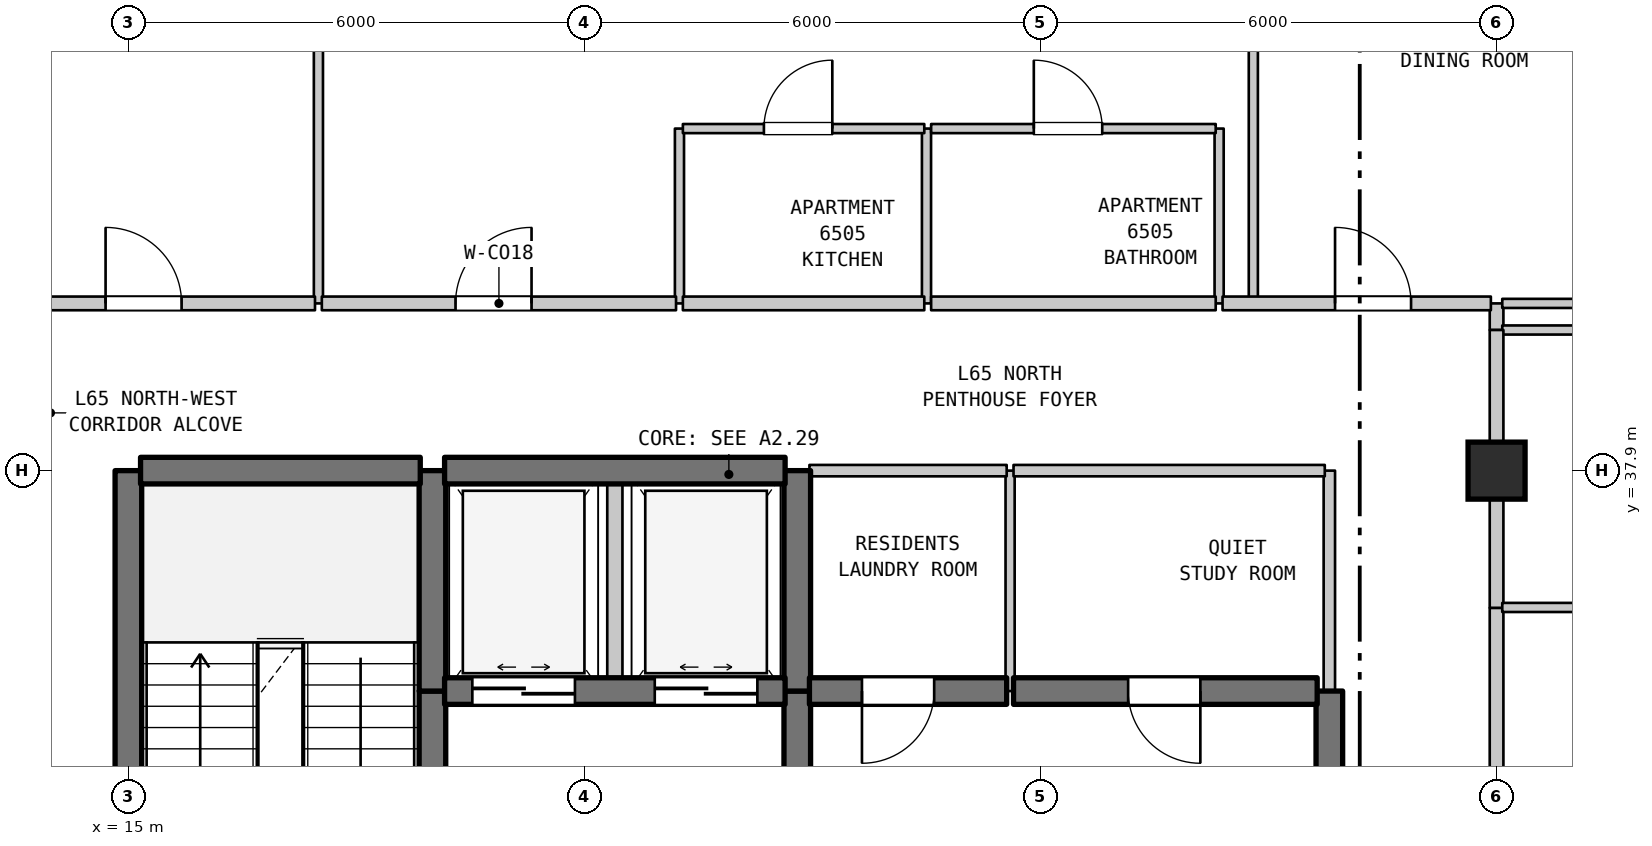
"""IFC4 building model, lengths in metres.
Left out: names, types, materials, properties, quantities, classifications, styles, units other than length and angle.
Written with IfcOpenShell. Run it as: python <this file> out.ifc"""

import sys

from ifc_helpers import new_model, si_unit, direction, frame, frame_2d, origin, origin_2d, place, context, subcontext, project, spatial, rectangle, extrude, element, fill, save


model = new_model("IFC4")
c1 = context("Model", 3, precision=1e-05, world=origin(), true_north=direction((0.0, 1.0)))
c2 = subcontext(c1, "Body", "Model", "MODEL_VIEW")
j1 = project(units=[si_unit("LENGTHUNIT", "METRE"), si_unit("PLANEANGLEUNIT", "RADIAN")], contexts=[c1])
p1 = place(None, origin())
s1 = spatial("IfcSite", under=j1, at=p1, CompositionType="ELEMENT")
p2 = place(p1, origin())
s2 = spatial("IfcBuilding", under=s1, at=p2, CompositionType="ELEMENT")
p3 = place(p2, frame((0.0, 0.0, 262.1)))
s3 = spatial("IfcBuildingStorey", under=s2, at=p3, CompositionType="ELEMENT", Elevation=262.1)
p4 = place(p3, frame((33.0, 37.9, 0.0), z_axis=(0.0, 0.0, 1.0), x_axis=(1.0, 0.0, 0.0)))
e1 = element("IfcColumn", 1, at=p4, inside=s3, PredefinedType="COLUMN", context=c2, shape_type="SweptSolid", body=[
    extrude(rectangle(XDim=0.75, YDim=0.75, at=origin_2d()), origin(), (0.0, 0.0, 1.0), 3.7),
])
p5 = place(p3, frame((15.0, 31.1, 0.0), z_axis=(0.0, 0.0, 1.0), x_axis=(0.0, 1.0, 0.0)))
e2 = element("IfcWall", 2, at=p5, inside=s3, PredefinedType="SHEAR", context=c2, shape_type="SweptSolid", body=[
    extrude(rectangle(XDim=6.8, YDim=0.35, at=frame_2d((3.4, 0.0))), origin(), (0.0, 0.0, 1.0), 3.39),
])
p6 = place(p3, frame((17.5, 40.1, 0.0), z_axis=(0.0, 0.0, 1.0), x_axis=(0.0, 1.0, 0.0)))
e3 = element("IfcWall", 3, at=p6, inside=s3, PredefinedType="PARTITIONING", context=c2, shape_type="SweptSolid", body=[
    extrude(rectangle(XDim=13.79, YDim=0.12, at=frame_2d((6.895, 0.0))), origin(), (0.0, 0.0, 1.0), 3.39),
])
p7 = place(p3, frame((19.0, 29.5, 0.0), z_axis=(0.0, 0.0, 1.0), x_axis=(0.0, 1.0, 0.0)))
e4 = element("IfcWall", 4, at=p7, inside=s3, PredefinedType="SHEAR", context=c2, shape_type="SweptSolid", body=[
    extrude(rectangle(XDim=5.5, YDim=0.35, at=frame_2d((2.75, 0.0))), origin(), (0.0, 0.0, 1.0), 3.39),
])
p8 = place(p7, frame((2.025, 0.0, 0.0)))
e5 = element("IfcOpeningElement", 5, at=p8, cuts=e4, PredefinedType="OPENING", context=c2, shape_type="SweptSolid", body=[
    extrude(rectangle(XDim=1.1, YDim=2.15, at=frame_2d((0.55, 1.075))), frame((0.0, 0.185, 0.0), z_axis=(0.0, -1.0, 0.0), x_axis=(1.0, 0.0, 0.0)), (0.0, 0.0, 1.0), 0.37),
])
p9 = place(p3, frame((19.0, 35.0, 0.0), z_axis=(0.0, 0.0, 1.0), x_axis=(0.0, 1.0, 0.0)))
e6 = element("IfcWall", 6, at=p9, inside=s3, PredefinedType="SHEAR", context=c2, shape_type="SweptSolid", body=[
    extrude(rectangle(XDim=2.9, YDim=0.35, at=frame_2d((1.45, 0.0))), origin(), (0.0, 0.0, 1.0), 3.39),
])
p10 = place(p3, frame((21.4, 35.0, 0.0), z_axis=(0.0, 0.0, 1.0), x_axis=(0.0, 1.0, 0.0)))
e7 = element("IfcWall", 7, at=p10, inside=s3, PredefinedType="STANDARD", context=c2, shape_type="SweptSolid", body=[
    extrude(rectangle(XDim=2.9, YDim=0.2, at=frame_2d((1.45, 0.0))), origin(), (0.0, 0.0, 1.0), 3.39),
])
p11 = place(p3, frame((22.25, 40.1, 0.0), z_axis=(0.0, 0.0, 1.0), x_axis=(0.0, 1.0, 0.0)))
e8 = element("IfcWall", 8, at=p11, inside=s3, PredefinedType="PARTITIONING", context=c2, shape_type="SweptSolid", body=[
    extrude(rectangle(XDim=2.3, YDim=0.12, at=frame_2d((1.15, 0.0))), origin(), (0.0, 0.0, 1.0), 3.39),
])
p12 = place(p3, frame((23.8, 31.5, 0.0), z_axis=(0.0, 0.0, 1.0), x_axis=(0.0, 1.0, 0.0)))
e9 = element("IfcWall", 9, at=p12, inside=s3, PredefinedType="SHEAR", context=c2, shape_type="SweptSolid", body=[
    extrude(rectangle(XDim=3.5, YDim=0.35, at=frame_2d((1.75, 0.0))), origin(), (0.0, 0.0, 1.0), 3.39),
])
p13 = place(p12, frame((1.127, 0.0, 0.0)))
e10 = element("IfcOpeningElement", 10, at=p13, cuts=e9, PredefinedType="OPENING", context=c2, shape_type="SweptSolid", body=[
    extrude(rectangle(XDim=1.1, YDim=2.15, at=frame_2d((0.55, 1.075))), frame((0.0, 0.185, 0.0), z_axis=(0.0, -1.0, 0.0), x_axis=(1.0, 0.0, 0.0)), (0.0, 0.0, 1.0), 0.37),
])
p14 = place(p3, frame((23.8, 35.0, 0.0), z_axis=(0.0, 0.0, 1.0), x_axis=(0.0, 1.0, 0.0)))
e11 = element("IfcWall", 11, at=p14, inside=s3, PredefinedType="SHEAR", context=c2, shape_type="SweptSolid", body=[
    extrude(rectangle(XDim=2.9, YDim=0.35, at=frame_2d((1.45, 0.0))), origin(), (0.0, 0.0, 1.0), 3.39),
])
p15 = place(p3, frame((25.5, 40.1, 0.0), z_axis=(0.0, 0.0, 1.0), x_axis=(0.0, 1.0, 0.0)))
e12 = element("IfcWall", 12, at=p15, inside=s3, PredefinedType="PARTITIONING", context=c2, shape_type="SweptSolid", body=[
    extrude(rectangle(XDim=2.3, YDim=0.12, at=frame_2d((1.15, 0.0))), origin(), (0.0, 0.0, 1.0), 3.39),
])
p16 = place(p3, frame((26.6, 35.0, 0.0), z_axis=(0.0, 0.0, 1.0), x_axis=(0.0, 1.0, 0.0)))
e13 = element("IfcWall", 13, at=p16, inside=s3, PredefinedType="PARTITIONING", context=c2, shape_type="SweptSolid", body=[
    extrude(rectangle(XDim=2.9, YDim=0.12, at=frame_2d((1.45, 0.0))), origin(), (0.0, 0.0, 1.0), 3.39),
])
p17 = place(p3, frame((29.35, 40.1, 0.0), z_axis=(0.0, 0.0, 1.0), x_axis=(0.0, 1.0, 0.0)))
e14 = element("IfcWall", 14, at=p17, inside=s3, PredefinedType="PARTITIONING", context=c2, shape_type="SweptSolid", body=[
    extrude(rectangle(XDim=2.3, YDim=0.12, at=frame_2d((1.15, 0.0))), origin(), (0.0, 0.0, 1.0), 3.39),
])
p18 = place(p3, frame((29.8, 40.1, 0.0), z_axis=(0.0, 0.0, 1.0), x_axis=(0.0, 1.0, 0.0)))
e15 = element("IfcWall", 15, at=p18, inside=s3, PredefinedType="PARTITIONING", context=c2, shape_type="SweptSolid", body=[
    extrude(rectangle(XDim=13.79, YDim=0.12, at=frame_2d((6.895, 0.0))), origin(), (0.0, 0.0, 1.0), 3.39),
])
p19 = place(p3, frame((30.8, 31.5, 0.0), z_axis=(0.0, 0.0, 1.0), x_axis=(0.0, 1.0, 0.0)))
e16 = element("IfcWall", 16, at=p19, inside=s3, PredefinedType="SHEAR", context=c2, shape_type="SweptSolid", body=[
    extrude(rectangle(XDim=3.5, YDim=0.35, at=frame_2d((1.75, 0.0))), origin(), (0.0, 0.0, 1.0), 3.39),
])
p20 = place(p19, frame((1.15, 0.0, 0.0)))
e17 = element("IfcOpeningElement", 17, at=p20, cuts=e16, PredefinedType="OPENING", context=c2, shape_type="SweptSolid", body=[
    extrude(rectangle(XDim=1.2, YDim=2.2, at=frame_2d((0.6, 1.1))), frame((0.0, 0.185, 0.0), z_axis=(0.0, -1.0, 0.0), x_axis=(1.0, 0.0, 0.0)), (0.0, 0.0, 1.0), 0.37),
])
p21 = place(p3, frame((30.8, 35.0, 0.0), z_axis=(0.0, 0.0, 1.0), x_axis=(0.0, 1.0, 0.0)))
e18 = element("IfcWall", 18, at=p21, inside=s3, PredefinedType="STANDARD", context=c2, shape_type="SweptSolid", body=[
    extrude(rectangle(XDim=2.9, YDim=0.15, at=frame_2d((1.45, 0.0))), origin(), (0.0, 0.0, 1.0), 3.39),
])
p22 = place(p3, frame((33.0, 33.085, 0.0), z_axis=(0.0, 0.0, 1.0), x_axis=(0.0, 1.0, 0.0)))
e19 = element("IfcWall", 19, at=p22, inside=s3, PredefinedType="STANDARD", context=c2, shape_type="SweptSolid", body=[
    extrude(rectangle(XDim=3.01, YDim=0.18, at=frame_2d((1.505, 0.0))), origin(), (0.0, 0.0, 1.0), 2.89),
])
p23 = place(p3, frame((33.0, 36.095, 0.0), z_axis=(0.0, 0.0, 1.0), x_axis=(0.0, 1.0, 0.0)))
e20 = element("IfcWall", 20, at=p23, inside=s3, PredefinedType="STANDARD", context=c2, shape_type="SweptSolid", body=[
    extrude(rectangle(XDim=1.805, YDim=0.18, at=frame_2d((0.902, 0.0))), origin(), (0.0, 0.0, 1.0), 2.89),
])
p24 = place(p3, frame((33.0, 39.75, 0.0), z_axis=(0.0, 0.0, 1.0), x_axis=(0.0, 1.0, 0.0)))
e21 = element("IfcWall", 21, at=p24, inside=s3, PredefinedType="STANDARD", context=c2, shape_type="SweptSolid", body=[
    extrude(rectangle(XDim=0.35, YDim=0.18, at=frame_2d((0.175, 0.0))), origin(), (0.0, 0.0, 1.0), 3.39),
])
p25 = place(p3, frame((19.16, 35.0, 0.0), z_axis=(0.0, 0.0, 1.0), x_axis=(1.0, 0.0, 0.0)))
e22 = element("IfcWall", 22, at=p25, inside=s3, PredefinedType="SHEAR", context=c2, shape_type="SweptSolid", body=[
    extrude(rectangle(XDim=4.48, YDim=0.35, at=frame_2d((2.24, 0.0))), origin(), (0.0, 0.0, 1.0), 3.39),
])
p26 = place(p25, frame((0.365, 0.0, 0.0)))
e23 = element("IfcOpeningElement", 23, at=p26, cuts=e22, PredefinedType="OPENING", context=c2, shape_type="SweptSolid", body=[
    extrude(rectangle(XDim=1.35, YDim=2.2, at=frame_2d((0.675, 1.1))), frame((0.0, 0.185, 0.0), z_axis=(0.0, -1.0, 0.0), x_axis=(1.0, 0.0, 0.0)), (0.0, 0.0, 1.0), 0.37),
])
p27 = place(p25, frame((2.765, 0.0, 0.0)))
e24 = element("IfcOpeningElement", 24, at=p27, cuts=e22, PredefinedType="OPENING", context=c2, shape_type="SweptSolid", body=[
    extrude(rectangle(XDim=1.35, YDim=2.2, at=frame_2d((0.675, 1.1))), frame((0.0, 0.185, 0.0), z_axis=(0.0, -1.0, 0.0), x_axis=(1.0, 0.0, 0.0)), (0.0, 0.0, 1.0), 0.37),
])
p28 = place(p3, frame((23.96, 35.0, 0.0), z_axis=(0.0, 0.0, 1.0), x_axis=(1.0, 0.0, 0.0)))
e25 = element("IfcWall", 25, at=p28, inside=s3, PredefinedType="SHEAR", context=c2, shape_type="SweptSolid", body=[
    extrude(rectangle(XDim=2.595, YDim=0.35, at=frame_2d((1.297, 0.0))), origin(), (0.0, 0.0, 1.0), 3.39),
])
p29 = place(p28, frame((0.691, 0.0, 0.0)))
e26 = element("IfcOpeningElement", 26, at=p29, cuts=e25, PredefinedType="OPENING", context=c2, shape_type="SweptSolid", body=[
    extrude(rectangle(XDim=0.95, YDim=2.15, at=frame_2d((0.475, 1.075))), frame((0.0, 0.185, 0.0), z_axis=(0.0, -1.0, 0.0), x_axis=(1.0, 0.0, 0.0)), (0.0, 0.0, 1.0), 0.37),
])
p30 = place(p3, frame((26.645, 35.0, 0.0), z_axis=(0.0, 0.0, 1.0), x_axis=(1.0, 0.0, 0.0)))
e27 = element("IfcWall", 27, at=p30, inside=s3, PredefinedType="SHEAR", context=c2, shape_type="SweptSolid", body=[
    extrude(rectangle(XDim=3.995, YDim=0.35, at=frame_2d((1.998, 0.0))), origin(), (0.0, 0.0, 1.0), 3.39),
])
p31 = place(p30, frame((1.508, 0.0, 0.0)))
e28 = element("IfcOpeningElement", 28, at=p31, cuts=e27, PredefinedType="OPENING", context=c2, shape_type="SweptSolid", body=[
    extrude(rectangle(XDim=0.95, YDim=2.15, at=frame_2d((0.475, 1.075))), frame((0.0, 0.185, 0.0), z_axis=(0.0, -1.0, 0.0), x_axis=(1.0, 0.0, 0.0)), (0.0, 0.0, 1.0), 0.37),
])
p32 = place(p3, frame((33.075, 36.1, 0.0), z_axis=(0.0, 0.0, 1.0), x_axis=(1.0, 0.0, 0.0)))
e29 = element("IfcWall", 29, at=p32, inside=s3, PredefinedType="PARTITIONING", context=c2, shape_type="SweptSolid", body=[
    extrude(rectangle(XDim=4.46, YDim=0.12, at=frame_2d((2.23, 0.0))), origin(), (0.0, 0.0, 1.0), 3.39),
])
p33 = place(p3, frame((15.16, 37.9, 0.0), z_axis=(0.0, 0.0, 1.0), x_axis=(1.0, 0.0, 0.0)))
e30 = element("IfcWall", 30, at=p33, inside=s3, PredefinedType="SHEAR", context=c2, shape_type="SweptSolid", body=[
    extrude(rectangle(XDim=3.68, YDim=0.35, at=frame_2d((1.84, 0.0))), origin(), (0.0, 0.0, 1.0), 3.39),
])
p34 = place(p3, frame((19.16, 37.9, 0.0), z_axis=(0.0, 0.0, 1.0), x_axis=(1.0, 0.0, 0.0)))
e31 = element("IfcWall", 31, at=p34, inside=s3, PredefinedType="SHEAR", context=c2, shape_type="SweptSolid", body=[
    extrude(rectangle(XDim=4.48, YDim=0.35, at=frame_2d((2.24, 0.0))), origin(), (0.0, 0.0, 1.0), 3.39),
])
p35 = place(p3, frame((23.96, 37.9, 0.0), z_axis=(0.0, 0.0, 1.0), x_axis=(1.0, 0.0, 0.0)))
e32 = element("IfcWall", 32, at=p35, inside=s3, PredefinedType="STANDARD", context=c2, shape_type="SweptSolid", body=[
    extrude(rectangle(XDim=2.595, YDim=0.15, at=frame_2d((1.297, 0.0))), origin(), (0.0, 0.0, 1.0), 2.89),
])
p36 = place(p3, frame((26.645, 37.9, 0.0), z_axis=(0.0, 0.0, 1.0), x_axis=(1.0, 0.0, 0.0)))
e33 = element("IfcWall", 33, at=p36, inside=s3, PredefinedType="STANDARD", context=c2, shape_type="SweptSolid", body=[
    extrude(rectangle(XDim=4.095, YDim=0.15, at=frame_2d((2.047, 0.0))), origin(), (0.0, 0.0, 1.0), 2.89),
])
p37 = place(p3, frame((33.075, 39.75, 0.0), z_axis=(0.0, 0.0, 1.0), x_axis=(1.0, 0.0, 0.0)))
e34 = element("IfcWall", 34, at=p37, inside=s3, PredefinedType="PARTITIONING", context=c2, shape_type="SweptSolid", body=[
    extrude(rectangle(XDim=4.46, YDim=0.12, at=frame_2d((2.23, 0.0))), origin(), (0.0, 0.0, 1.0), 3.39),
])
p38 = place(p3, frame((12.975, 40.1, 0.0), z_axis=(0.0, 0.0, 1.0), x_axis=(1.0, 0.0, 0.0)))
e35 = element("IfcWall", 35, at=p38, inside=s3, PredefinedType="STANDARD", context=c2, shape_type="SweptSolid", body=[
    extrude(rectangle(XDim=4.48, YDim=0.18, at=frame_2d((2.24, 0.0))), origin(), (0.0, 0.0, 1.0), 3.39),
])
p39 = place(p38, frame((1.725, 0.0, 0.0)))
e36 = element("IfcOpeningElement", 36, at=p39, cuts=e35, PredefinedType="OPENING", context=c2, shape_type="SweptSolid", body=[
    extrude(rectangle(XDim=1.0, YDim=2.15, at=frame_2d((0.5, 1.075))), frame((0.0, 0.1, 0.0), z_axis=(0.0, -1.0, 0.0), x_axis=(1.0, 0.0, 0.0)), (0.0, 0.0, 1.0), 0.2),
])
p40 = place(p3, frame((17.545, 40.1, 0.0), z_axis=(0.0, 0.0, 1.0), x_axis=(1.0, 0.0, 0.0)))
e37 = element("IfcWall", 37, at=p40, inside=s3, PredefinedType="STANDARD", context=c2, shape_type="SweptSolid", body=[
    extrude(rectangle(XDim=4.66, YDim=0.18, at=frame_2d((2.33, 0.0))), origin(), (0.0, 0.0, 1.0), 3.39),
])
p41 = place(p40, frame((1.759, 0.0, 0.0)))
e38 = element("IfcOpeningElement", 38, at=p41, cuts=e37, PredefinedType="OPENING", context=c2, shape_type="SweptSolid", body=[
    extrude(rectangle(XDim=1.0, YDim=2.15, at=frame_2d((0.5, 1.075))), frame((0.0, 0.1, 0.0), z_axis=(0.0, -1.0, 0.0), x_axis=(1.0, 0.0, 0.0)), (0.0, 0.0, 1.0), 0.2),
])
p42 = place(p3, frame((22.295, 40.1, 0.0), z_axis=(0.0, 0.0, 1.0), x_axis=(1.0, 0.0, 0.0)))
e39 = element("IfcWall", 39, at=p42, inside=s3, PredefinedType="STANDARD", context=c2, shape_type="SweptSolid", body=[
    extrude(rectangle(XDim=3.176, YDim=0.18, at=frame_2d((1.588, 0.0))), origin(), (0.0, 0.0, 1.0), 3.39),
])
p43 = place(p3, frame((25.561, 40.1, 0.0), z_axis=(0.0, 0.0, 1.0), x_axis=(1.0, 0.0, 0.0)))
e40 = element("IfcWall", 40, at=p43, inside=s3, PredefinedType="STANDARD", context=c2, shape_type="SweptSolid", body=[
    extrude(rectangle(XDim=3.744, YDim=0.18, at=frame_2d((1.872, 0.0))), origin(), (0.0, 0.0, 1.0), 3.39),
])
p44 = place(p3, frame((29.395, 40.1, 0.0), z_axis=(0.0, 0.0, 1.0), x_axis=(1.0, 0.0, 0.0)))
e41 = element("IfcWall", 41, at=p44, inside=s3, PredefinedType="STANDARD", context=c2, shape_type="SweptSolid", body=[
    extrude(rectangle(XDim=3.53, YDim=0.18, at=frame_2d((1.765, 0.0))), origin(), (0.0, 0.0, 1.0), 3.39),
])
p45 = place(p44, frame((1.48, 0.0, 0.0)))
e42 = element("IfcOpeningElement", 42, at=p45, cuts=e41, PredefinedType="OPENING", context=c2, shape_type="SweptSolid", body=[
    extrude(rectangle(XDim=1.0, YDim=2.15, at=frame_2d((0.5, 1.075))), frame((0.0, 0.1, 0.0), z_axis=(0.0, -1.0, 0.0), x_axis=(1.0, 0.0, 0.0)), (0.0, 0.0, 1.0), 0.2),
])
p46 = place(p3, frame((33.075, 40.1, 0.0), z_axis=(0.0, 0.0, 1.0), x_axis=(1.0, 0.0, 0.0)))
e43 = element("IfcWall", 43, at=p46, inside=s3, PredefinedType="PARTITIONING", context=c2, shape_type="SweptSolid", body=[
    extrude(rectangle(XDim=1.41, YDim=0.12, at=frame_2d((0.705, 0.0))), origin(), (0.0, 0.0, 1.0), 3.39),
])
p47 = place(p3, frame((22.295, 42.4, 0.0), z_axis=(0.0, 0.0, 1.0), x_axis=(1.0, 0.0, 0.0)))
e44 = element("IfcWall", 44, at=p47, inside=s3, PredefinedType="PARTITIONING", context=c2, shape_type="SweptSolid", body=[
    extrude(rectangle(XDim=3.176, YDim=0.12, at=frame_2d((1.588, 0.0))), origin(), (0.0, 0.0, 1.0), 3.39),
])
p48 = place(p47, frame((1.066, 0.0, 0.0)))
e45 = element("IfcOpeningElement", 45, at=p48, cuts=e44, PredefinedType="OPENING", context=c2, shape_type="SweptSolid", body=[
    extrude(rectangle(XDim=0.9, YDim=2.15, at=frame_2d((0.45, 1.075))), frame((0.0, 0.07, 0.0), z_axis=(0.0, -1.0, 0.0), x_axis=(1.0, 0.0, 0.0)), (0.0, 0.0, 1.0), 0.14),
])
p49 = place(p3, frame((25.561, 42.4, 0.0), z_axis=(0.0, 0.0, 1.0), x_axis=(1.0, 0.0, 0.0)))
e46 = element("IfcWall", 46, at=p49, inside=s3, PredefinedType="PARTITIONING", context=c2, shape_type="SweptSolid", body=[
    extrude(rectangle(XDim=3.744, YDim=0.12, at=frame_2d((1.872, 0.0))), origin(), (0.0, 0.0, 1.0), 3.39),
])
p50 = place(p49, frame((1.351, 0.0, 0.0)))
e47 = element("IfcOpeningElement", 47, at=p50, cuts=e46, PredefinedType="OPENING", context=c2, shape_type="SweptSolid", body=[
    extrude(rectangle(XDim=0.9, YDim=2.1, at=frame_2d((0.45, 1.05))), frame((0.0, 0.07, 0.0), z_axis=(0.0, -1.0, 0.0), x_axis=(1.0, 0.0, 0.0)), (0.0, 0.0, 1.0), 0.14),
])
p51 = place(p3, frame((33.0, 37.9, 0.0), z_axis=(0.0, 0.0, 1.0), x_axis=(0.0, 1.0, 0.0)))
e48 = element("IfcWall", 48, at=p51, inside=s3, PredefinedType="STANDARD", context=c2, shape_type="SweptSolid", body=[
    extrude(rectangle(XDim=1.85, YDim=0.18, at=frame_2d((0.925, 0.0))), origin(), (0.0, 0.0, 1.0), 2.79),
])
p52 = place(p26, origin())
e49 = element("IfcDoor", 49, at=p52, inside=s3, OperationType="DOUBLE_DOOR_SLIDING", PredefinedType="DOOR", context=c2, shape_type="SweptSolid", body=[
    extrude(rectangle(XDim=1.35, YDim=2.2, at=frame_2d((0.675, 1.1))), frame((0.0, 0.025, 0.0), z_axis=(0.0, -1.0, 0.0), x_axis=(1.0, 0.0, 0.0)), (0.0, 0.0, 1.0), 0.05),
])
fill(e23, e49)
p53 = place(p27, origin())
e50 = element("IfcDoor", 50, at=p53, inside=s3, OperationType="DOUBLE_DOOR_SLIDING", PredefinedType="DOOR", context=c2, shape_type="SweptSolid", body=[
    extrude(rectangle(XDim=1.35, YDim=2.2, at=frame_2d((0.675, 1.1))), frame((0.0, 0.025, 0.0), z_axis=(0.0, -1.0, 0.0), x_axis=(1.0, 0.0, 0.0)), (0.0, 0.0, 1.0), 0.05),
])
fill(e24, e50)
p54 = place(p29, frame((0.95, 0.0, 0.0), z_axis=(0.0, 0.0, 1.0), x_axis=(-1.0, 0.0, 0.0)))
e51 = element("IfcDoor", 51, at=p54, inside=s3, OperationType="SINGLE_SWING_LEFT", PredefinedType="DOOR", context=c2, shape_type="SweptSolid", body=[
    extrude(rectangle(XDim=0.95, YDim=2.15, at=frame_2d((0.475, 1.075))), frame((0.0, 0.025, 0.0), z_axis=(0.0, -1.0, 0.0), x_axis=(1.0, 0.0, 0.0)), (0.0, 0.0, 1.0), 0.05),
])
fill(e26, e51)
p55 = place(p31, frame((0.95, 0.0, 0.0), z_axis=(0.0, 0.0, 1.0), x_axis=(-1.0, 0.0, 0.0)))
e52 = element("IfcDoor", 52, at=p55, inside=s3, OperationType="SINGLE_SWING_RIGHT", PredefinedType="DOOR", context=c2, shape_type="SweptSolid", body=[
    extrude(rectangle(XDim=0.95, YDim=2.15, at=frame_2d((0.475, 1.075))), frame((0.0, 0.025, 0.0), z_axis=(0.0, -1.0, 0.0), x_axis=(1.0, 0.0, 0.0)), (0.0, 0.0, 1.0), 0.05),
])
fill(e28, e52)
p56 = place(p39, origin())
e53 = element("IfcDoor", 53, at=p56, inside=s3, OperationType="SINGLE_SWING_LEFT", PredefinedType="DOOR", context=c2, shape_type="SweptSolid", body=[
    extrude(rectangle(XDim=1.0, YDim=2.15, at=frame_2d((0.5, 1.075))), frame((0.0, 0.025, 0.0), z_axis=(0.0, -1.0, 0.0), x_axis=(1.0, 0.0, 0.0)), (0.0, 0.0, 1.0), 0.05),
])
fill(e36, e53)
p57 = place(p41, origin())
e54 = element("IfcDoor", 54, at=p57, inside=s3, OperationType="SINGLE_SWING_RIGHT", PredefinedType="DOOR", context=c2, shape_type="SweptSolid", body=[
    extrude(rectangle(XDim=1.0, YDim=2.15, at=frame_2d((0.5, 1.075))), frame((0.0, 0.025, 0.0), z_axis=(0.0, -1.0, 0.0), x_axis=(1.0, 0.0, 0.0)), (0.0, 0.0, 1.0), 0.05),
])
fill(e38, e54)
p58 = place(p45, origin())
e55 = element("IfcDoor", 55, at=p58, inside=s3, OperationType="SINGLE_SWING_LEFT", PredefinedType="DOOR", context=c2, shape_type="SweptSolid", body=[
    extrude(rectangle(XDim=1.0, YDim=2.15, at=frame_2d((0.5, 1.075))), frame((0.0, 0.025, 0.0), z_axis=(0.0, -1.0, 0.0), x_axis=(1.0, 0.0, 0.0)), (0.0, 0.0, 1.0), 0.05),
])
fill(e42, e55)
p59 = place(p48, origin())
e56 = element("IfcDoor", 56, at=p59, inside=s3, OperationType="SINGLE_SWING_RIGHT", PredefinedType="DOOR", context=c2, shape_type="SweptSolid", body=[
    extrude(rectangle(XDim=0.9, YDim=2.15, at=frame_2d((0.45, 1.075))), frame((0.0, 0.025, 0.0), z_axis=(0.0, -1.0, 0.0), x_axis=(1.0, 0.0, 0.0)), (0.0, 0.0, 1.0), 0.05),
])
fill(e45, e56)
p60 = place(p50, origin())
e57 = element("IfcDoor", 57, at=p60, inside=s3, OperationType="SINGLE_SWING_LEFT", PredefinedType="DOOR", context=c2, shape_type="SweptSolid", body=[
    extrude(rectangle(XDim=0.9, YDim=2.1, at=frame_2d((0.45, 1.05))), frame((0.0, 0.025, 0.0), z_axis=(0.0, -1.0, 0.0), x_axis=(1.0, 0.0, 0.0)), (0.0, 0.0, 1.0), 0.05),
])
fill(e47, e57)
save(model, sys.argv[1])
